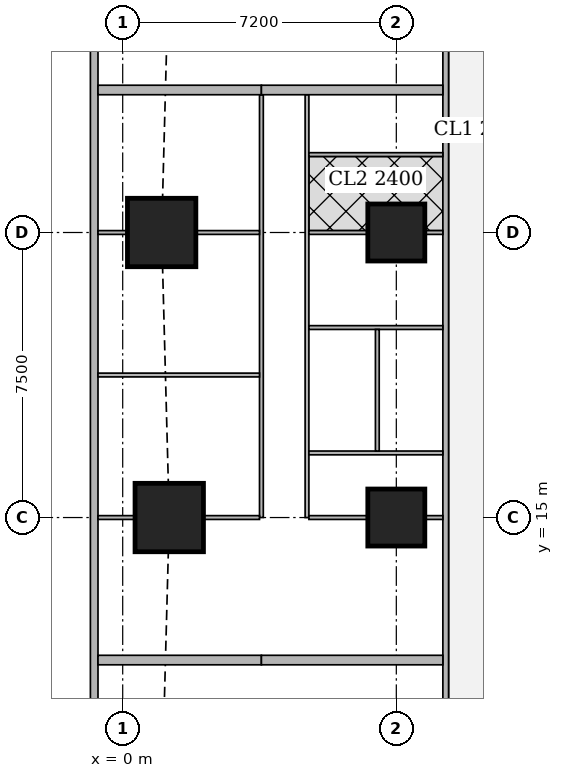
"""IFC4 building model, lengths in metres.
Left out: names, types, materials, properties, quantities, classifications, styles, units other than length and angle.
Written with IfcOpenShell. Run it as: python <this file> out.ifc"""

import sys

from ifc_helpers import new_model, si_unit, direction, frame, frame_2d, origin, origin_2d, place, context, subcontext, project, spatial, rectangle, extrude, element, fill, save


model = new_model("IFC4")
c1 = context("Model", 3, precision=1e-05, world=origin(), true_north=direction((0.0, 1.0)))
c2 = subcontext(c1, "Body", "Model", "MODEL_VIEW")
j1 = project(units=[si_unit("LENGTHUNIT", "METRE"), si_unit("PLANEANGLEUNIT", "RADIAN")], contexts=[c1])
p1 = place(None, origin())
s1 = spatial("IfcSite", under=j1, at=p1, CompositionType="ELEMENT")
p2 = place(p1, origin())
s2 = spatial("IfcBuilding", under=s1, at=p2, CompositionType="ELEMENT")
p3 = place(p2, frame((0.0, 0.0, 158.3)))
s3 = spatial("IfcBuildingStorey", under=s2, at=p3, CompositionType="ELEMENT", Elevation=158.3)
p4 = place(p3, frame((1.225, 15.0, 0.0), z_axis=(0.0, 0.0, 1.0), x_axis=(1.0, 0.0, 0.0)))
e1 = element("IfcColumn", 1, at=p4, inside=s3, PredefinedType="COLUMN", context=c2, shape_type="SweptSolid", body=[
    extrude(rectangle(XDim=1.8, YDim=1.8, at=origin_2d()), origin(), (0.0, 0.0, 1.0), 3.75),
])
p5 = place(p3, frame((7.2, 15.0, 0.0), z_axis=(0.0, 0.0, 1.0), x_axis=(1.0, 0.0, 0.0)))
e2 = element("IfcColumn", 2, at=p5, inside=s3, PredefinedType="COLUMN", context=c2, shape_type="SweptSolid", body=[
    extrude(rectangle(XDim=1.5, YDim=1.5, at=origin_2d()), origin(), (0.0, 0.0, 1.0), 3.75),
])
p6 = place(p3, frame((1.025, 22.5, 0.0), z_axis=(0.0, 0.0, 1.0), x_axis=(1.0, 0.0, 0.0)))
e3 = element("IfcColumn", 3, at=p6, inside=s3, PredefinedType="COLUMN", context=c2, shape_type="SweptSolid", body=[
    extrude(rectangle(XDim=1.8, YDim=1.8, at=origin_2d()), origin(), (0.0, 0.0, 1.0), 3.75),
])
p7 = place(p3, frame((7.2, 22.5, 0.0), z_axis=(0.0, 0.0, 1.0), x_axis=(1.0, 0.0, 0.0)))
e4 = element("IfcColumn", 4, at=p7, inside=s3, PredefinedType="COLUMN", context=c2, shape_type="SweptSolid", body=[
    extrude(rectangle(XDim=1.5, YDim=1.5, at=origin_2d()), origin(), (0.0, 0.0, 1.0), 3.75),
])
p8 = place(p3, frame((-0.75, 42.837, 0.0), z_axis=(0.0, 0.0, 1.0), x_axis=(0.0, -1.0, 0.0)))
e5 = element("IfcWall", 5, at=p8, inside=s3, PredefinedType="SOLIDWALL", context=c2, shape_type="SweptSolid", body=[
    extrude(rectangle(XDim=40.674, YDim=0.2, at=frame_2d((20.337, 0.0))), origin(), (0.0, 0.0, 1.0), 3.5),
])
p9 = place(p8, frame((1.78, 0.0, 0.9)))
e6 = element("IfcOpeningElement", 6, at=p9, cuts=e5, PredefinedType="OPENING", context=c2, shape_type="SweptSolid", body=[
    extrude(rectangle(XDim=1.8, YDim=1.5, at=frame_2d((0.9, 0.75))), frame((0.0, 0.11, 0.0), z_axis=(0.0, -1.0, 0.0), x_axis=(1.0, 0.0, 0.0)), (0.0, 0.0, 1.0), 0.22),
])
p10 = place(p8, frame((6.312, 0.0, 0.9)))
e7 = element("IfcOpeningElement", 7, at=p10, cuts=e5, PredefinedType="OPENING", context=c2, shape_type="SweptSolid", body=[
    extrude(rectangle(XDim=1.8, YDim=1.5, at=frame_2d((0.9, 0.75))), frame((0.0, 0.11, 0.0), z_axis=(0.0, -1.0, 0.0), x_axis=(1.0, 0.0, 0.0)), (0.0, 0.0, 1.0), 0.22),
])
p11 = place(p8, frame((10.062, 0.0, 0.9)))
e8 = element("IfcOpeningElement", 8, at=p11, cuts=e5, PredefinedType="OPENING", context=c2, shape_type="SweptSolid", body=[
    extrude(rectangle(XDim=1.8, YDim=1.5, at=frame_2d((0.9, 0.75))), frame((0.0, 0.11, 0.0), z_axis=(0.0, -1.0, 0.0), x_axis=(1.0, 0.0, 0.0)), (0.0, 0.0, 1.0), 0.22),
])
p12 = place(p8, frame((13.812, 0.0, 0.9)))
e9 = element("IfcOpeningElement", 9, at=p12, cuts=e5, PredefinedType="OPENING", context=c2, shape_type="SweptSolid", body=[
    extrude(rectangle(XDim=1.8, YDim=1.5, at=frame_2d((0.9, 0.75))), frame((0.0, 0.11, 0.0), z_axis=(0.0, -1.0, 0.0), x_axis=(1.0, 0.0, 0.0)), (0.0, 0.0, 1.0), 0.22),
])
p13 = place(p8, frame((17.562, 0.0, 0.9)))
e10 = element("IfcOpeningElement", 10, at=p13, cuts=e5, PredefinedType="OPENING", context=c2, shape_type="SweptSolid", body=[
    extrude(rectangle(XDim=1.8, YDim=1.5, at=frame_2d((0.9, 0.75))), frame((0.0, 0.11, 0.0), z_axis=(0.0, -1.0, 0.0), x_axis=(1.0, 0.0, 0.0)), (0.0, 0.0, 1.0), 0.22),
])
p14 = place(p8, frame((21.312, 0.0, 0.9)))
e11 = element("IfcOpeningElement", 11, at=p14, cuts=e5, PredefinedType="OPENING", context=c2, shape_type="SweptSolid", body=[
    extrude(rectangle(XDim=1.8, YDim=1.5, at=frame_2d((0.9, 0.75))), frame((0.0, 0.11, 0.0), z_axis=(0.0, -1.0, 0.0), x_axis=(1.0, 0.0, 0.0)), (0.0, 0.0, 1.0), 0.22),
])
p15 = place(p8, frame((25.062, 0.0, 0.9)))
e12 = element("IfcOpeningElement", 12, at=p15, cuts=e5, PredefinedType="OPENING", context=c2, shape_type="SweptSolid", body=[
    extrude(rectangle(XDim=1.8, YDim=1.5, at=frame_2d((0.9, 0.75))), frame((0.0, 0.11, 0.0), z_axis=(0.0, -1.0, 0.0), x_axis=(1.0, 0.0, 0.0)), (0.0, 0.0, 1.0), 0.22),
])
p16 = place(p8, frame((28.812, 0.0, 0.9)))
e13 = element("IfcOpeningElement", 13, at=p16, cuts=e5, PredefinedType="OPENING", context=c2, shape_type="SweptSolid", body=[
    extrude(rectangle(XDim=1.8, YDim=1.5, at=frame_2d((0.9, 0.75))), frame((0.0, 0.11, 0.0), z_axis=(0.0, -1.0, 0.0), x_axis=(1.0, 0.0, 0.0)), (0.0, 0.0, 1.0), 0.22),
])
p17 = place(p8, frame((32.562, 0.0, 0.9)))
e14 = element("IfcOpeningElement", 14, at=p17, cuts=e5, PredefinedType="OPENING", context=c2, shape_type="SweptSolid", body=[
    extrude(rectangle(XDim=1.8, YDim=1.5, at=frame_2d((0.9, 0.75))), frame((0.0, 0.11, 0.0), z_axis=(0.0, -1.0, 0.0), x_axis=(1.0, 0.0, 0.0)), (0.0, 0.0, 1.0), 0.22),
])
p18 = place(p8, frame((37.094, 0.0, 0.9)))
e15 = element("IfcOpeningElement", 15, at=p18, cuts=e5, PredefinedType="OPENING", context=c2, shape_type="SweptSolid", body=[
    extrude(rectangle(XDim=1.8, YDim=1.5, at=frame_2d((0.9, 0.75))), frame((0.0, 0.11, 0.0), z_axis=(0.0, -1.0, 0.0), x_axis=(1.0, 0.0, 0.0)), (0.0, 0.0, 1.0), 0.22),
])
p19 = place(p3, frame((8.5, 1.964, 0.0), z_axis=(0.0, 0.0, 1.0), x_axis=(0.0, 1.0, 0.0)))
e16 = element("IfcWall", 16, at=p19, inside=s3, PredefinedType="SOLIDWALL", context=c2, shape_type="SweptSolid", body=[
    extrude(rectangle(XDim=41.097, YDim=0.15, at=frame_2d((20.548, 0.0))), origin(), (0.0, 0.0, 1.0), 3.5),
])
p20 = place(p19, frame((6.911, 0.0, 0.0)))
e17 = element("IfcOpeningElement", 17, at=p20, cuts=e16, PredefinedType="OPENING", context=c2, shape_type="SweptSolid", body=[
    extrude(rectangle(XDim=1.0, YDim=2.1, at=frame_2d((0.5, 1.05))), frame((0.0, 0.085, 0.0), z_axis=(0.0, -1.0, 0.0), x_axis=(1.0, 0.0, 0.0)), (0.0, 0.0, 1.0), 0.17),
])
p21 = place(p19, frame((10.661, 0.0, 0.0)))
e18 = element("IfcOpeningElement", 18, at=p21, cuts=e16, PredefinedType="OPENING", context=c2, shape_type="SweptSolid", body=[
    extrude(rectangle(XDim=1.0, YDim=2.1, at=frame_2d((0.5, 1.05))), frame((0.0, 0.085, 0.0), z_axis=(0.0, -1.0, 0.0), x_axis=(1.0, 0.0, 0.0)), (0.0, 0.0, 1.0), 0.17),
])
p22 = place(p19, frame((25.661, 0.0, 0.0)))
e19 = element("IfcOpeningElement", 19, at=p22, cuts=e16, PredefinedType="OPENING", context=c2, shape_type="SweptSolid", body=[
    extrude(rectangle(XDim=1.0, YDim=2.1, at=frame_2d((0.5, 1.05))), frame((0.0, 0.085, 0.0), z_axis=(0.0, -1.0, 0.0), x_axis=(1.0, 0.0, 0.0)), (0.0, 0.0, 1.0), 0.17),
])
p23 = place(p3, frame((3.65, 15.0, 0.0), z_axis=(0.0, 0.0, 1.0), x_axis=(0.0, 1.0, 0.0)))
e20 = element("IfcWall", 20, at=p23, inside=s3, PredefinedType="PARTITIONING", context=c2, shape_type="SweptSolid", body=[
    extrude(rectangle(XDim=11.125, YDim=0.1, at=frame_2d((5.562, 0.0))), origin(), (0.0, 0.0, 1.0), 3.5),
])
p24 = place(p23, frame((0.2, 0.0, 0.0)))
e21 = element("IfcOpeningElement", 21, at=p24, cuts=e20, PredefinedType="OPENING", context=c2, shape_type="SweptSolid", body=[
    extrude(rectangle(XDim=0.9, YDim=2.1, at=frame_2d((0.45, 1.05))), frame((0.0, 0.06, 0.0), z_axis=(0.0, -1.0, 0.0), x_axis=(1.0, 0.0, 0.0)), (0.0, 0.0, 1.0), 0.12),
])
p25 = place(p23, frame((3.95, 0.0, 0.0)))
e22 = element("IfcOpeningElement", 22, at=p25, cuts=e20, PredefinedType="OPENING", context=c2, shape_type="SweptSolid", body=[
    extrude(rectangle(XDim=0.9, YDim=2.1, at=frame_2d((0.45, 1.05))), frame((0.0, 0.06, 0.0), z_axis=(0.0, -1.0, 0.0), x_axis=(1.0, 0.0, 0.0)), (0.0, 0.0, 1.0), 0.12),
])
p26 = place(p23, frame((7.7, 0.0, 0.0)))
e23 = element("IfcOpeningElement", 23, at=p26, cuts=e20, PredefinedType="OPENING", context=c2, shape_type="SweptSolid", body=[
    extrude(rectangle(XDim=0.9, YDim=2.1, at=frame_2d((0.45, 1.05))), frame((0.0, 0.06, 0.0), z_axis=(0.0, -1.0, 0.0), x_axis=(1.0, 0.0, 0.0)), (0.0, 0.0, 1.0), 0.12),
])
p27 = place(p3, frame((4.85, 15.0, 0.0), z_axis=(0.0, 0.0, 1.0), x_axis=(0.0, 1.0, 0.0)))
e24 = element("IfcWall", 24, at=p27, inside=s3, PredefinedType="PARTITIONING", context=c2, shape_type="SweptSolid", body=[
    extrude(rectangle(XDim=11.125, YDim=0.1, at=frame_2d((5.562, 0.0))), origin(), (0.0, 0.0, 1.0), 3.5),
])
p28 = place(p27, frame((0.4, 0.0, 0.0)))
e25 = element("IfcOpeningElement", 25, at=p28, cuts=e24, PredefinedType="OPENING", context=c2, shape_type="SweptSolid", body=[
    extrude(rectangle(XDim=0.9, YDim=2.1, at=frame_2d((0.45, 1.05))), frame((0.0, 0.06, 0.0), z_axis=(0.0, -1.0, 0.0), x_axis=(1.0, 0.0, 0.0)), (0.0, 0.0, 1.0), 0.12),
])
p29 = place(p27, frame((5.799, 0.0, 0.0)))
e26 = element("IfcOpeningElement", 26, at=p29, cuts=e24, PredefinedType="OPENING", context=c2, shape_type="SweptSolid", body=[
    extrude(rectangle(XDim=0.9, YDim=2.1, at=frame_2d((0.45, 1.05))), frame((0.0, 0.06, 0.0), z_axis=(0.0, -1.0, 0.0), x_axis=(1.0, 0.0, 0.0)), (0.0, 0.0, 1.0), 0.12),
])
p30 = place(p27, frame((8.075, 0.0, 0.0)))
e27 = element("IfcOpeningElement", 27, at=p30, cuts=e24, PredefinedType="OPENING", context=c2, shape_type="SweptSolid", body=[
    extrude(rectangle(XDim=0.9, YDim=2.1, at=frame_2d((0.45, 1.05))), frame((0.0, 0.06, 0.0), z_axis=(0.0, -1.0, 0.0), x_axis=(1.0, 0.0, 0.0)), (0.0, 0.0, 1.0), 0.12),
])
p31 = place(p27, frame((2.899, 0.0, 0.0)))
e28 = element("IfcOpeningElement", 28, at=p31, cuts=e24, PredefinedType="OPENING", context=c2, shape_type="SweptSolid", body=[
    extrude(rectangle(XDim=0.9, YDim=2.1, at=frame_2d((0.45, 1.05))), frame((0.0, 0.06, 0.0), z_axis=(0.0, -1.0, 0.0), x_axis=(1.0, 0.0, 0.0)), (0.0, 0.0, 1.0), 0.12),
])
p32 = place(p27, frame((9.95, 0.0, 0.0)))
e29 = element("IfcOpeningElement", 29, at=p32, cuts=e24, PredefinedType="OPENING", context=c2, shape_type="SweptSolid", body=[
    extrude(rectangle(XDim=0.9, YDim=2.1, at=frame_2d((0.45, 1.05))), frame((0.0, 0.06, 0.0), z_axis=(0.0, -1.0, 0.0), x_axis=(1.0, 0.0, 0.0)), (0.0, 0.0, 1.0), 0.12),
])
p33 = place(p3, frame((-0.65, 15.0, 0.0), z_axis=(0.0, 0.0, 1.0), x_axis=(1.0, 0.0, 0.0)))
e30 = element("IfcWall", 30, at=p33, inside=s3, PredefinedType="PARTITIONING", context=c2, shape_type="SweptSolid", body=[
    extrude(rectangle(XDim=0.974, YDim=0.1, at=frame_2d((0.487, 0.0))), origin(), (0.0, 0.0, 1.0), 3.5),
])
p34 = place(p3, frame((2.126, 15.0, 0.0), z_axis=(0.0, 0.0, 1.0), x_axis=(1.0, 0.0, 0.0)))
e31 = element("IfcWall", 31, at=p34, inside=s3, PredefinedType="PARTITIONING", context=c2, shape_type="SweptSolid", body=[
    extrude(rectangle(XDim=1.474, YDim=0.1, at=frame_2d((0.737, 0.0))), origin(), (0.0, 0.0, 1.0), 3.5),
])
p35 = place(p3, frame((-0.65, 18.75, 0.0), z_axis=(0.0, 0.0, 1.0), x_axis=(1.0, 0.0, 0.0)))
e32 = element("IfcWall", 32, at=p35, inside=s3, PredefinedType="PARTITIONING", context=c2, shape_type="SweptSolid", body=[
    extrude(rectangle(XDim=4.25, YDim=0.1, at=frame_2d((2.125, 0.0))), origin(), (0.0, 0.0, 1.0), 2.1),
])
p36 = place(p3, frame((-0.65, 22.5, 0.0), z_axis=(0.0, 0.0, 1.0), x_axis=(1.0, 0.0, 0.0)))
e33 = element("IfcWall", 33, at=p36, inside=s3, PredefinedType="PARTITIONING", context=c2, shape_type="SweptSolid", body=[
    extrude(rectangle(XDim=0.774, YDim=0.1, at=frame_2d((0.387, 0.0))), origin(), (0.0, 0.0, 1.0), 3.5),
])
p37 = place(p3, frame((1.926, 22.5, 0.0), z_axis=(0.0, 0.0, 1.0), x_axis=(1.0, 0.0, 0.0)))
e34 = element("IfcWall", 34, at=p37, inside=s3, PredefinedType="PARTITIONING", context=c2, shape_type="SweptSolid", body=[
    extrude(rectangle(XDim=1.674, YDim=0.1, at=frame_2d((0.837, 0.0))), origin(), (0.0, 0.0, 1.0), 3.5),
])
p38 = place(p3, frame((4.9, 15.0, 0.0), z_axis=(0.0, 0.0, 1.0), x_axis=(1.0, 0.0, 0.0)))
e35 = element("IfcWall", 35, at=p38, inside=s3, PredefinedType="PARTITIONING", context=c2, shape_type="SweptSolid", body=[
    extrude(rectangle(XDim=1.549, YDim=0.1, at=frame_2d((0.774, 0.0))), origin(), (0.0, 0.0, 1.0), 3.5),
])
p39 = place(p3, frame((7.951, 15.0, 0.0), z_axis=(0.0, 0.0, 1.0), x_axis=(1.0, 0.0, 0.0)))
e36 = element("IfcWall", 36, at=p39, inside=s3, PredefinedType="PARTITIONING", context=c2, shape_type="SweptSolid", body=[
    extrude(rectangle(XDim=0.474, YDim=0.1, at=frame_2d((0.237, 0.0))), origin(), (0.0, 0.0, 1.0), 3.5),
])
p40 = place(p3, frame((4.9, 19.999, 0.0), z_axis=(0.0, 0.0, 1.0), x_axis=(1.0, 0.0, 0.0)))
e37 = element("IfcWall", 37, at=p40, inside=s3, PredefinedType="PARTITIONING", context=c2, shape_type="SweptSolid", body=[
    extrude(rectangle(XDim=3.525, YDim=0.1, at=frame_2d((1.763, 0.0))), origin(), (0.0, 0.0, 1.0), 3.5),
])
p41 = place(p3, frame((4.9, 22.5, 0.0), z_axis=(0.0, 0.0, 1.0), x_axis=(1.0, 0.0, 0.0)))
e38 = element("IfcWall", 38, at=p41, inside=s3, PredefinedType="PARTITIONING", context=c2, shape_type="SweptSolid", body=[
    extrude(rectangle(XDim=1.549, YDim=0.1, at=frame_2d((0.774, 0.0))), origin(), (0.0, 0.0, 1.0), 3.5),
])
p42 = place(p3, frame((7.951, 22.5, 0.0), z_axis=(0.0, 0.0, 1.0), x_axis=(1.0, 0.0, 0.0)))
e39 = element("IfcWall", 39, at=p42, inside=s3, PredefinedType="PARTITIONING", context=c2, shape_type="SweptSolid", body=[
    extrude(rectangle(XDim=0.474, YDim=0.1, at=frame_2d((0.237, 0.0))), origin(), (0.0, 0.0, 1.0), 3.5),
])
for number, where, z_axis, x_axis in (
    (40, (4.9, 16.7, 0.0), (0.0, 0.0, 1.0), (1.0, 0.0, 0.0)),
    (41, (4.9, 24.55, 0.0), (0.0, 0.0, 1.0), (1.0, 0.0, 0.0)),
):
    element("IfcWall", number, at=place(p3, frame(where, z_axis=z_axis, x_axis=x_axis)), inside=s3, PredefinedType="PARTITIONING", context=c2, shape_type="SweptSolid", body=[
        extrude(rectangle(XDim=3.525, YDim=0.1, at=frame_2d((1.763, 0.0))), origin(), (0.0, 0.0, 1.0), 3.5),
    ])
p43 = place(p3, frame((-0.65, 11.25, 0.0), z_axis=(0.0, 0.0, 1.0), x_axis=(1.0, 0.0, 0.0)))
e42 = element("IfcWall", 42, at=p43, inside=s3, PredefinedType="SOLIDWALL", context=c2, shape_type="SweptSolid", body=[
    extrude(rectangle(XDim=4.3, YDim=0.25, at=frame_2d((2.15, 0.0))), origin(), (0.0, 0.0, 1.0), 2.1),
])
p44 = place(p3, frame((3.65, 11.25, 0.0), z_axis=(0.0, 0.0, 1.0), x_axis=(1.0, 0.0, 0.0)))
e43 = element("IfcWall", 43, at=p44, inside=s3, PredefinedType="SOLIDWALL", context=c2, shape_type="SweptSolid", body=[
    extrude(rectangle(XDim=4.775, YDim=0.25, at=frame_2d((2.388, 0.0))), origin(), (0.0, 0.0, 1.0), 3.5),
])
p45 = place(p3, frame((-0.65, 26.25, 0.0), z_axis=(0.0, 0.0, 1.0), x_axis=(1.0, 0.0, 0.0)))
e44 = element("IfcWall", 44, at=p45, inside=s3, PredefinedType="SOLIDWALL", context=c2, shape_type="SweptSolid", body=[
    extrude(rectangle(XDim=4.3, YDim=0.25, at=frame_2d((2.15, 0.0))), origin(), (0.0, 0.0, 1.0), 2.1),
])
p46 = place(p3, frame((3.65, 26.25, 0.0), z_axis=(0.0, 0.0, 1.0), x_axis=(1.0, 0.0, 0.0)))
e45 = element("IfcWall", 45, at=p46, inside=s3, PredefinedType="SOLIDWALL", context=c2, shape_type="SweptSolid", body=[
    extrude(rectangle(XDim=4.775, YDim=0.25, at=frame_2d((2.388, 0.0))), origin(), (0.0, 0.0, 1.0), 3.5),
])
p47 = place(p3, frame((6.7, 16.75, 0.0), z_axis=(0.0, 0.0, 1.0), x_axis=(0.0, 1.0, 0.0)))
e46 = element("IfcWall", 46, at=p47, inside=s3, PredefinedType="PARTITIONING", context=c2, shape_type="SweptSolid", body=[
    extrude(rectangle(XDim=3.199, YDim=0.1, at=frame_2d((1.6, 0.0))), origin(), (0.0, 0.0, 1.0), 3.5),
])
p48 = place(p47, frame((1.149, 0.0, 0.0)))
e47 = element("IfcOpeningElement", 47, at=p48, cuts=e46, PredefinedType="OPENING", context=c2, shape_type="SweptSolid", body=[
    extrude(rectangle(XDim=0.9, YDim=2.1, at=frame_2d((0.45, 1.05))), frame((0.0, 0.06, 0.0), z_axis=(0.0, -1.0, 0.0), x_axis=(1.0, 0.0, 0.0)), (0.0, 0.0, 1.0), 0.12),
])
p49 = place(p12, origin())
e48 = element("IfcWindow", 48, at=p49, inside=s3, PartitioningType="SINGLE_PANEL", PredefinedType="WINDOW", context=c2, shape_type="SweptSolid", body=[
    extrude(rectangle(XDim=1.8, YDim=1.5, at=frame_2d((0.9, 0.75))), frame((0.0, 0.03, 0.0), z_axis=(0.0, -1.0, 0.0), x_axis=(1.0, 0.0, 0.0)), (0.0, 0.0, 1.0), 0.06),
])
fill(e9, e48)
p50 = place(p13, origin())
e49 = element("IfcWindow", 49, at=p50, inside=s3, PartitioningType="SINGLE_PANEL", PredefinedType="WINDOW", context=c2, shape_type="SweptSolid", body=[
    extrude(rectangle(XDim=1.8, YDim=1.5, at=frame_2d((0.9, 0.75))), frame((0.0, 0.03, 0.0), z_axis=(0.0, -1.0, 0.0), x_axis=(1.0, 0.0, 0.0)), (0.0, 0.0, 1.0), 0.06),
])
fill(e10, e49)
p51 = place(p14, origin())
e50 = element("IfcWindow", 50, at=p51, inside=s3, PartitioningType="SINGLE_PANEL", PredefinedType="WINDOW", context=c2, shape_type="SweptSolid", body=[
    extrude(rectangle(XDim=1.8, YDim=1.5, at=frame_2d((0.9, 0.75))), frame((0.0, 0.03, 0.0), z_axis=(0.0, -1.0, 0.0), x_axis=(1.0, 0.0, 0.0)), (0.0, 0.0, 1.0), 0.06),
])
fill(e11, e50)
p52 = place(p15, origin())
e51 = element("IfcWindow", 51, at=p52, inside=s3, PartitioningType="SINGLE_PANEL", PredefinedType="WINDOW", context=c2, shape_type="SweptSolid", body=[
    extrude(rectangle(XDim=1.8, YDim=1.5, at=frame_2d((0.9, 0.75))), frame((0.0, 0.03, 0.0), z_axis=(0.0, -1.0, 0.0), x_axis=(1.0, 0.0, 0.0)), (0.0, 0.0, 1.0), 0.06),
])
fill(e12, e51)
p53 = place(p16, origin())
e52 = element("IfcWindow", 52, at=p53, inside=s3, PartitioningType="SINGLE_PANEL", PredefinedType="WINDOW", context=c2, shape_type="SweptSolid", body=[
    extrude(rectangle(XDim=1.8, YDim=1.5, at=frame_2d((0.9, 0.75))), frame((0.0, 0.03, 0.0), z_axis=(0.0, -1.0, 0.0), x_axis=(1.0, 0.0, 0.0)), (0.0, 0.0, 1.0), 0.06),
])
fill(e13, e52)
p54 = place(p17, origin())
e53 = element("IfcWindow", 53, at=p54, inside=s3, PartitioningType="SINGLE_PANEL", PredefinedType="WINDOW", context=c2, shape_type="SweptSolid", body=[
    extrude(rectangle(XDim=1.8, YDim=1.5, at=frame_2d((0.9, 0.75))), frame((0.0, 0.03, 0.0), z_axis=(0.0, -1.0, 0.0), x_axis=(1.0, 0.0, 0.0)), (0.0, 0.0, 1.0), 0.06),
])
fill(e14, e53)
p55 = place(p24, origin())
e54 = element("IfcDoor", 54, at=p55, inside=s3, OperationType="SINGLE_SWING_LEFT", PredefinedType="DOOR", context=c2, shape_type="SweptSolid", body=[
    extrude(rectangle(XDim=0.9, YDim=2.1, at=frame_2d((0.45, 1.05))), frame((0.0, 0.025, 0.0), z_axis=(0.0, -1.0, 0.0), x_axis=(1.0, 0.0, 0.0)), (0.0, 0.0, 1.0), 0.05),
])
fill(e21, e54)
p56 = place(p25, origin())
e55 = element("IfcDoor", 55, at=p56, inside=s3, OperationType="SINGLE_SWING_LEFT", PredefinedType="DOOR", context=c2, shape_type="SweptSolid", body=[
    extrude(rectangle(XDim=0.9, YDim=2.1, at=frame_2d((0.45, 1.05))), frame((0.0, 0.025, 0.0), z_axis=(0.0, -1.0, 0.0), x_axis=(1.0, 0.0, 0.0)), (0.0, 0.0, 1.0), 0.05),
])
fill(e22, e55)
p57 = place(p26, origin())
e56 = element("IfcDoor", 56, at=p57, inside=s3, OperationType="SINGLE_SWING_LEFT", PredefinedType="DOOR", context=c2, shape_type="SweptSolid", body=[
    extrude(rectangle(XDim=0.9, YDim=2.1, at=frame_2d((0.45, 1.05))), frame((0.0, 0.025, 0.0), z_axis=(0.0, -1.0, 0.0), x_axis=(1.0, 0.0, 0.0)), (0.0, 0.0, 1.0), 0.05),
])
fill(e23, e56)
p58 = place(p28, origin())
e57 = element("IfcDoor", 57, at=p58, inside=s3, OperationType="SINGLE_SWING_RIGHT", PredefinedType="DOOR", context=c2, shape_type="SweptSolid", body=[
    extrude(rectangle(XDim=0.9, YDim=2.1, at=frame_2d((0.45, 1.05))), frame((0.0, 0.025, 0.0), z_axis=(0.0, -1.0, 0.0), x_axis=(1.0, 0.0, 0.0)), (0.0, 0.0, 1.0), 0.05),
])
fill(e25, e57)
p59 = place(p29, origin())
e58 = element("IfcDoor", 58, at=p59, inside=s3, OperationType="SINGLE_SWING_LEFT", PredefinedType="DOOR", context=c2, shape_type="SweptSolid", body=[
    extrude(rectangle(XDim=0.9, YDim=2.1, at=frame_2d((0.45, 1.05))), frame((0.0, 0.025, 0.0), z_axis=(0.0, -1.0, 0.0), x_axis=(1.0, 0.0, 0.0)), (0.0, 0.0, 1.0), 0.05),
])
fill(e26, e58)
p60 = place(p30, origin())
e59 = element("IfcDoor", 59, at=p60, inside=s3, OperationType="SINGLE_SWING_LEFT", PredefinedType="DOOR", context=c2, shape_type="SweptSolid", body=[
    extrude(rectangle(XDim=0.9, YDim=2.1, at=frame_2d((0.45, 1.05))), frame((0.0, 0.025, 0.0), z_axis=(0.0, -1.0, 0.0), x_axis=(1.0, 0.0, 0.0)), (0.0, 0.0, 1.0), 0.05),
])
fill(e27, e59)
p61 = place(p31, origin())
e60 = element("IfcDoor", 60, at=p61, inside=s3, OperationType="SINGLE_SWING_RIGHT", PredefinedType="DOOR", context=c2, shape_type="SweptSolid", body=[
    extrude(rectangle(XDim=0.9, YDim=2.1, at=frame_2d((0.45, 1.05))), frame((0.0, 0.025, 0.0), z_axis=(0.0, -1.0, 0.0), x_axis=(1.0, 0.0, 0.0)), (0.0, 0.0, 1.0), 0.05),
])
fill(e28, e60)
p62 = place(p32, origin())
e61 = element("IfcDoor", 61, at=p62, inside=s3, OperationType="SINGLE_SWING_LEFT", PredefinedType="DOOR", context=c2, shape_type="SweptSolid", body=[
    extrude(rectangle(XDim=0.9, YDim=2.1, at=frame_2d((0.45, 1.05))), frame((0.0, 0.025, 0.0), z_axis=(0.0, -1.0, 0.0), x_axis=(1.0, 0.0, 0.0)), (0.0, 0.0, 1.0), 0.05),
])
fill(e29, e61)
p63 = place(p21, origin())
e62 = element("IfcDoor", 62, at=p63, inside=s3, OperationType="SINGLE_SWING_LEFT", PredefinedType="DOOR", context=c2, shape_type="SweptSolid", body=[
    extrude(rectangle(XDim=1.0, YDim=2.1, at=frame_2d((0.5, 1.05))), frame((0.0, 0.025, 0.0), z_axis=(0.0, -1.0, 0.0), x_axis=(1.0, 0.0, 0.0)), (0.0, 0.0, 1.0), 0.05),
])
fill(e18, e62)
p64 = place(p48, origin())
e63 = element("IfcDoor", 63, at=p64, inside=s3, OperationType="SINGLE_SWING_RIGHT", PredefinedType="DOOR", context=c2, shape_type="SweptSolid", body=[
    extrude(rectangle(XDim=0.9, YDim=2.1, at=frame_2d((0.45, 1.05))), frame((0.0, 0.025, 0.0), z_axis=(0.0, -1.0, 0.0), x_axis=(1.0, 0.0, 0.0)), (0.0, 0.0, 1.0), 0.05),
])
fill(e47, e63)
save(model, sys.argv[1])
